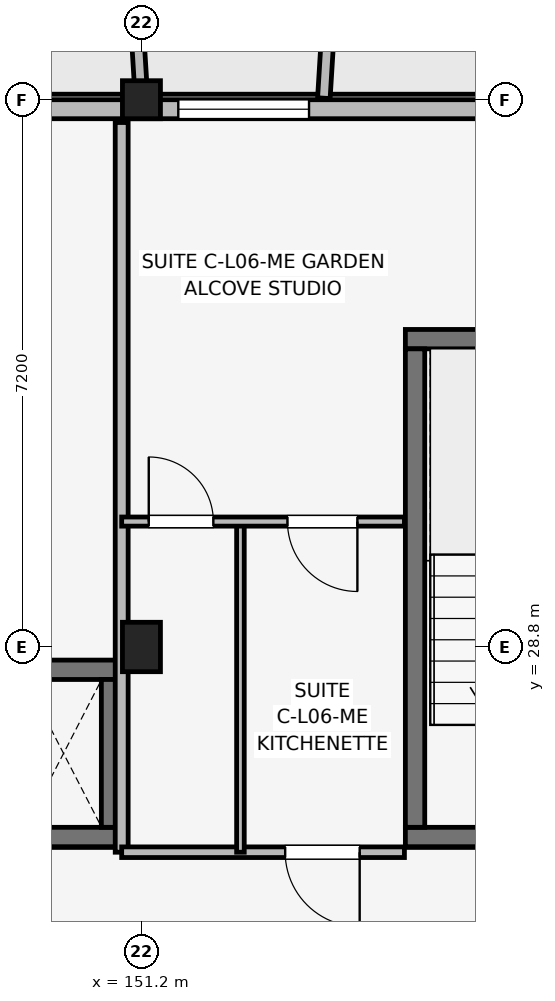
"""IFC4 building model, lengths in metres.
Left out: names, types, materials, properties, quantities, classifications, styles, units other than length and angle.
Written with IfcOpenShell. Run it as: python <this file> out.ifc"""

import sys

from ifc_helpers import new_model, si_unit, direction, frame, frame_2d, origin, origin_2d, place, context, subcontext, project, spatial, rectangle, extrude, element, fill, save


model = new_model("IFC4")
c1 = context("Model", 3, precision=1e-05, world=origin(), true_north=direction((0.0, 1.0)))
c2 = subcontext(c1, "Body", "Model", "MODEL_VIEW")
j1 = project(units=[si_unit("LENGTHUNIT", "METRE"), si_unit("PLANEANGLEUNIT", "RADIAN")], contexts=[c1])
p1 = place(None, origin())
s1 = spatial("IfcSite", under=j1, at=p1, CompositionType="ELEMENT")
p2 = place(p1, origin())
s2 = spatial("IfcBuilding", under=s1, at=p2, CompositionType="ELEMENT")
p3 = place(p2, frame((0.0, 0.0, 21.3)))
s3 = spatial("IfcBuildingStorey", under=s2, at=p3, CompositionType="ELEMENT", Elevation=21.3)
p4 = place(p3, frame((151.2, 28.8, 0.0), z_axis=(0.0, 0.0, 1.0), x_axis=(1.0, 0.0, 0.0)))
e1 = element("IfcColumn", 1, at=p4, inside=s3, PredefinedType="COLUMN", context=c2, shape_type="SweptSolid", body=[
    extrude(rectangle(XDim=0.5, YDim=0.65, at=origin_2d()), origin(), (0.0, 0.0, 1.0), 3.15),
])
p5 = place(p3, frame((151.2, 36.0, 0.0), z_axis=(0.0, 0.0, 1.0), x_axis=(1.0, 0.0, 0.0)))
e2 = element("IfcColumn", 2, at=p5, inside=s3, PredefinedType="COLUMN", context=c2, shape_type="SweptSolid", body=[
    extrude(rectangle(XDim=0.5, YDim=0.5, at=origin_2d()), origin(), (0.0, 0.0, 1.0), 3.15),
])
p6 = place(p3, frame((154.673, 26.3, 0.0), z_axis=(0.0, 0.0, 1.0), x_axis=(1.0, 0.0, 0.0)))
e3 = element("IfcWall", 3, at=p6, inside=s3, PredefinedType="SHEAR", context=c2, shape_type="SweptSolid", body=[
    extrude(rectangle(XDim=3.305, YDim=0.255, at=frame_2d((1.652, 0.0))), origin(), (0.0, 0.0, 1.0), 3.15),
])
p7 = place(p6, frame((1.127, 0.0, 0.0)))
e4 = element("IfcOpeningElement", 4, at=p7, cuts=e3, PredefinedType="OPENING", context=c2, shape_type="SweptSolid", body=[
    extrude(rectangle(XDim=1.05, YDim=2.12, at=frame_2d((0.525, 1.06))), frame((0.0, 0.137, 0.0), z_axis=(0.0, -1.0, 0.0), x_axis=(1.0, 0.0, 0.0)), (0.0, 0.0, 1.0), 0.275),
])
p8 = place(p3, frame((154.673, 32.85, 0.0), z_axis=(0.0, 0.0, 1.0), x_axis=(1.0, 0.0, 0.0)))
e5 = element("IfcWall", 5, at=p8, inside=s3, PredefinedType="SHEAR", context=c2, shape_type="SweptSolid", body=[
    extrude(rectangle(XDim=3.305, YDim=0.255, at=frame_2d((1.652, 0.0))), origin(), (0.0, 0.0, 1.0), 3.15),
])
p9 = place(p3, frame((154.8, 26.427, 0.0), z_axis=(0.0, 0.0, 1.0), x_axis=(0.0, 1.0, 0.0)))
e6 = element("IfcWall", 6, at=p9, inside=s3, PredefinedType="SHEAR", context=c2, shape_type="SweptSolid", body=[
    extrude(rectangle(XDim=6.295, YDim=0.255, at=frame_2d((3.147, 0.0))), origin(), (0.0, 0.0, 1.0), 3.15),
])
for number, where, z_axis, x_axis in (
    (7, (149.123, 26.3, 0.0), (0.0, 0.0, 1.0), (1.0, 0.0, 0.0)),
    (8, (149.123, 28.5, 0.0), (0.0, 0.0, 1.0), (1.0, 0.0, 0.0)),
):
    element("IfcWall", number, at=place(p3, frame(where, z_axis=z_axis, x_axis=x_axis)), inside=s3, PredefinedType="SHEAR", context=c2, shape_type="SweptSolid", body=[
        extrude(rectangle(XDim=1.805, YDim=0.255, at=frame_2d((0.902, 0.0))), origin(), (0.0, 0.0, 1.0), 3.15),
    ])
p10 = place(p3, frame((150.8, 26.427, 0.0), z_axis=(0.0, 0.0, 1.0), x_axis=(0.0, 1.0, 0.0)))
e9 = element("IfcWall", 9, at=p10, inside=s3, PredefinedType="SHEAR", context=c2, shape_type="SweptSolid", body=[
    extrude(rectangle(XDim=1.945, YDim=0.255, at=frame_2d((0.973, 0.0))), origin(), (0.0, 0.0, 1.0), 3.15),
])
p11 = place(p3, frame((162.6, 35.875, 0.0), z_axis=(0.0, 0.0, 1.0), x_axis=(-1.0, 0.0, 0.0)))
e10 = element("IfcWall", 10, at=p11, inside=s3, PredefinedType="SOLIDWALL", context=c2, shape_type="SweptSolid", body=[
    extrude(rectangle(XDim=30.0, YDim=0.25, at=frame_2d((15.0, 0.0))), origin(), (0.0, 0.0, 1.0), 2.43),
])
p12 = place(p11, frame((27.95, 0.0, 0.0), z_axis=(0.0, 0.0, 1.0), x_axis=(-1.0, 0.0, 0.0)))
e11 = element("IfcOpeningElement", 11, at=p12, cuts=e10, PredefinedType="OPENING", context=c2, shape_type="SweptSolid", body=[
    extrude(rectangle(XDim=1.5, YDim=2.15, at=frame_2d((0.75, 1.075))), frame((0.0, 0.135, 0.0), z_axis=(0.0, -1.0, 0.0), x_axis=(1.0, 0.0, 0.0)), (0.0, 0.0, 1.0), 0.27),
])
p13 = place(p11, frame((3.55, 0.0, 0.0), z_axis=(0.0, 0.0, 1.0), x_axis=(-1.0, 0.0, 0.0)))
e12 = element("IfcOpeningElement", 12, at=p13, cuts=e10, PredefinedType="OPENING", context=c2, shape_type="SweptSolid", body=[
    extrude(rectangle(XDim=1.5, YDim=2.15, at=frame_2d((0.75, 1.075))), frame((0.0, 0.135, 0.0), z_axis=(0.0, -1.0, 0.0), x_axis=(1.0, 0.0, 0.0)), (0.0, 0.0, 1.0), 0.27),
])
p14 = place(p11, frame((14.625, 0.0, 0.5)))
e13 = element("IfcOpeningElement", 13, at=p14, cuts=e10, PredefinedType="OPENING", context=c2, shape_type="SweptSolid", body=[
    extrude(rectangle(XDim=0.75, YDim=1.75, at=frame_2d((0.375, 0.875))), frame((0.0, 0.135, 0.0), z_axis=(0.0, -1.0, 0.0), x_axis=(1.0, 0.0, 0.0)), (0.0, 0.0, 1.0), 0.27),
])
p15 = place(p11, frame((9.195, 0.0, 0.7)))
e14 = element("IfcOpeningElement", 14, at=p15, cuts=e10, PredefinedType="OPENING", context=c2, shape_type="SweptSolid", body=[
    extrude(rectangle(XDim=1.72, YDim=1.6, at=frame_2d((0.86, 0.8))), frame((0.0, 0.135, 0.0), z_axis=(0.0, -1.0, 0.0), x_axis=(1.0, 0.0, 0.0)), (0.0, 0.0, 1.0), 0.27),
])
p16 = place(p11, frame((19.015, 0.0, 0.7)))
e15 = element("IfcOpeningElement", 15, at=p16, cuts=e10, PredefinedType="OPENING", context=c2, shape_type="SweptSolid", body=[
    extrude(rectangle(XDim=1.86, YDim=1.6, at=frame_2d((0.93, 0.8))), frame((0.0, 0.135, 0.0), z_axis=(0.0, -1.0, 0.0), x_axis=(1.0, 0.0, 0.0)), (0.0, 0.0, 1.0), 0.27),
])
p17 = place(p3, frame((151.2, 36.02, 0.0), z_axis=(0.0, 0.0, 1.0), x_axis=(-0.061046865508, 0.998134900808, 0.0)))
e16 = element("IfcWall", 16, at=p17, inside=s3, PredefinedType="ELEMENTEDWALL", context=c2, shape_type="SweptSolid", body=[
    extrude(rectangle(XDim=1.964, YDim=0.165, at=frame_2d((0.982, 0.0))), origin(), (0.0, 0.0, 1.0), 2.95),
])
p18 = place(p3, frame((153.6, 36.02, 0.0), z_axis=(0.0, 0.0, 1.0), x_axis=(0.061046865508, 0.998134900808, 0.0)))
e17 = element("IfcWall", 17, at=p18, inside=s3, PredefinedType="ELEMENTEDWALL", context=c2, shape_type="SweptSolid", body=[
    extrude(rectangle(XDim=1.964, YDim=0.165, at=frame_2d((0.982, 0.0))), origin(), (0.0, 0.0, 1.0), 2.48),
])
p19 = place(p3, frame((150.94, 26.1, 0.0), z_axis=(0.0, 0.0, 1.0), x_axis=(0.0, 1.0, 0.0)))
e18 = element("IfcWall", 18, at=p19, inside=s3, PredefinedType="PARTITIONING", context=c2, shape_type="SweptSolid", body=[
    extrude(rectangle(XDim=9.6, YDim=0.17, at=frame_2d((4.8, 0.0))), origin(), (0.0, 0.0, 1.0), 2.38),
])
p20 = place(p3, frame((150.94, 26.1, 0.0), z_axis=(0.0, 0.0, 1.0), x_axis=(1.0, 0.0, 0.0)))
e19 = element("IfcWall", 19, at=p20, inside=s3, PredefinedType="PARTITIONING", context=c2, shape_type="SweptSolid", body=[
    extrude(rectangle(XDim=3.72, YDim=0.14, at=frame_2d((1.86, 0.0))), origin(), (0.0, 0.0, 1.0), 2.38),
])
p21 = place(p20, frame((3.131, 0.0, 0.0), z_axis=(0.0, 0.0, 1.0), x_axis=(-1.0, 0.0, 0.0)))
e20 = element("IfcOpeningElement", 20, at=p21, cuts=e19, PredefinedType="OPENING", context=c2, shape_type="SweptSolid", body=[
    extrude(rectangle(XDim=0.98, YDim=2.1, at=frame_2d((0.49, 1.05))), frame((0.0, 0.08, 0.0), z_axis=(0.0, -1.0, 0.0), x_axis=(1.0, 0.0, 0.0)), (0.0, 0.0, 1.0), 0.16),
])
p22 = place(p3, frame((152.502, 26.1, 0.0), z_axis=(0.0, 0.0, 1.0), x_axis=(0.0, 1.0, 0.0)))
e21 = element("IfcWall", 21, at=p22, inside=s3, PredefinedType="PARTITIONING", context=c2, shape_type="SweptSolid", body=[
    extrude(rectangle(XDim=4.35, YDim=0.1, at=frame_2d((2.175, 0.0))), origin(), (0.0, 0.0, 1.0), 2.38),
])
p23 = place(p3, frame((150.94, 30.45, 0.0), z_axis=(0.0, 0.0, 1.0), x_axis=(1.0, 0.0, 0.0)))
e22 = element("IfcWall", 22, at=p23, inside=s3, PredefinedType="PARTITIONING", context=c2, shape_type="SweptSolid", body=[
    extrude(rectangle(XDim=3.72, YDim=0.12, at=frame_2d((1.86, 0.0))), origin(), (0.0, 0.0, 1.0), 2.38),
])
p24 = place(p23, frame((0.356, 0.0, 0.0)))
e23 = element("IfcOpeningElement", 23, at=p24, cuts=e22, PredefinedType="OPENING", context=c2, shape_type="SweptSolid", body=[
    extrude(rectangle(XDim=0.85, YDim=2.08, at=frame_2d((0.425, 1.04))), frame((0.0, 0.07, 0.0), z_axis=(0.0, -1.0, 0.0), x_axis=(1.0, 0.0, 0.0)), (0.0, 0.0, 1.0), 0.14),
])
p25 = place(p23, frame((3.101, 0.0, 0.0), z_axis=(0.0, 0.0, 1.0), x_axis=(-1.0, 0.0, 0.0)))
e24 = element("IfcOpeningElement", 24, at=p25, cuts=e22, PredefinedType="OPENING", context=c2, shape_type="SweptSolid", body=[
    extrude(rectangle(XDim=0.92, YDim=2.08, at=frame_2d((0.46, 1.04))), frame((0.0, 0.07, 0.0), z_axis=(0.0, -1.0, 0.0), x_axis=(1.0, 0.0, 0.0)), (0.0, 0.0, 1.0), 0.14),
])
p26 = place(p15, origin())
e25 = element("IfcWindow", 25, at=p26, inside=s3, PartitioningType="SINGLE_PANEL", PredefinedType="WINDOW", context=c2, shape_type="SweptSolid", body=[
    extrude(rectangle(XDim=1.72, YDim=1.6, at=frame_2d((0.86, 0.8))), frame((0.0, 0.03, 0.0), z_axis=(0.0, -1.0, 0.0), x_axis=(1.0, 0.0, 0.0)), (0.0, 0.0, 1.0), 0.06),
])
fill(e14, e25)
p27 = place(p21, origin())
e26 = element("IfcDoor", 26, at=p27, inside=s3, OperationType="SINGLE_SWING_RIGHT", PredefinedType="DOOR", context=c2, shape_type="SweptSolid", body=[
    extrude(rectangle(XDim=0.98, YDim=2.1, at=frame_2d((0.49, 1.05))), frame((0.0, 0.025, 0.0), z_axis=(0.0, -1.0, 0.0), x_axis=(1.0, 0.0, 0.0)), (0.0, 0.0, 1.0), 0.05),
])
fill(e20, e26)
p28 = place(p24, origin())
e27 = element("IfcDoor", 27, at=p28, inside=s3, OperationType="SINGLE_SWING_LEFT", PredefinedType="DOOR", context=c2, shape_type="SweptSolid", body=[
    extrude(rectangle(XDim=0.85, YDim=2.08, at=frame_2d((0.425, 1.04))), frame((0.0, 0.025, 0.0), z_axis=(0.0, -1.0, 0.0), x_axis=(1.0, 0.0, 0.0)), (0.0, 0.0, 1.0), 0.05),
])
fill(e23, e27)
p29 = place(p25, origin())
e28 = element("IfcDoor", 28, at=p29, inside=s3, OperationType="SINGLE_SWING_RIGHT", PredefinedType="DOOR", context=c2, shape_type="SweptSolid", body=[
    extrude(rectangle(XDim=0.92, YDim=2.08, at=frame_2d((0.46, 1.04))), frame((0.0, 0.025, 0.0), z_axis=(0.0, -1.0, 0.0), x_axis=(1.0, 0.0, 0.0)), (0.0, 0.0, 1.0), 0.05),
])
fill(e24, e28)
save(model, sys.argv[1])
